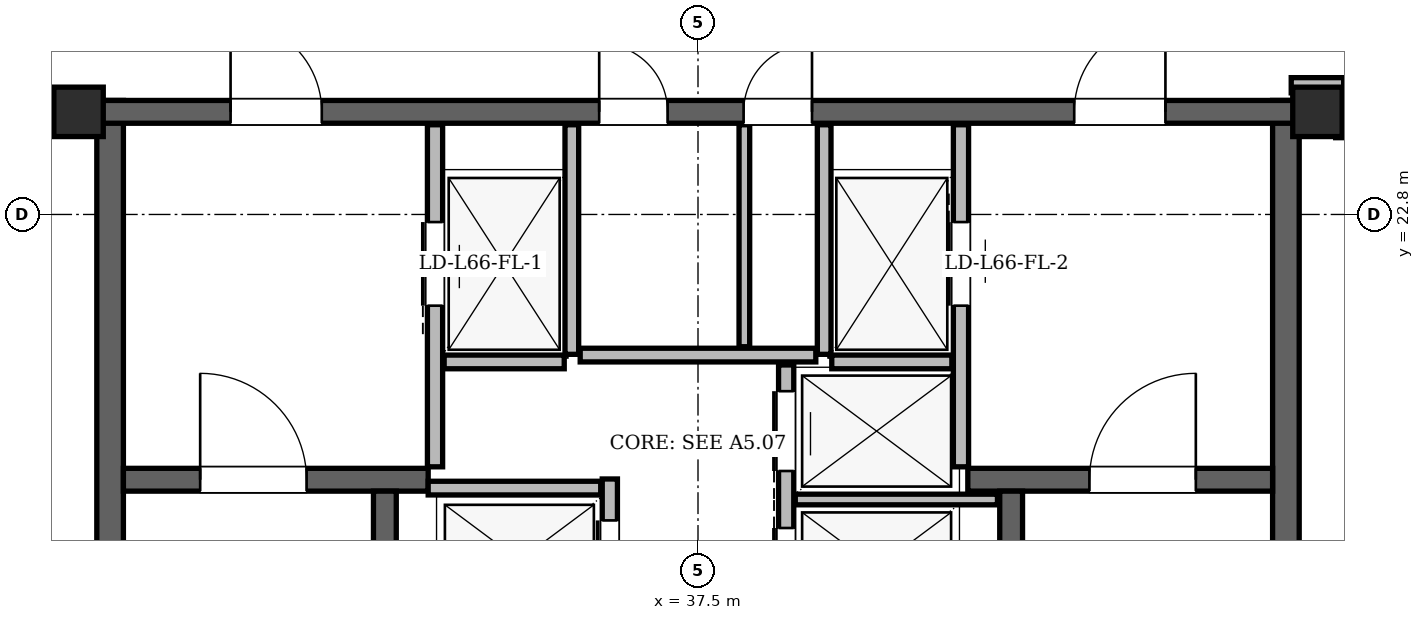
"""IFC4 building model, lengths in metres.
Left out: names, types, materials, properties, quantities, classifications, styles, units other than length and angle.
Written with IfcOpenShell. Run it as: python <this file> out.ifc"""

import sys

from ifc_helpers import new_model, si_unit, direction, frame, frame_2d, origin, origin_2d, place, context, subcontext, project, spatial, rectangle, hollow_rectangle, extrude, element, fill, save


model = new_model("IFC4")
c1 = context("Model", 3, precision=1e-05, world=origin(), true_north=direction((0.0, 1.0)))
c2 = subcontext(c1, "Body", "Model", "MODEL_VIEW")
j1 = project(units=[si_unit("LENGTHUNIT", "METRE"), si_unit("PLANEANGLEUNIT", "RADIAN")], contexts=[c1])
p1 = place(None, origin())
s1 = spatial("IfcSite", under=j1, at=p1, CompositionType="ELEMENT")
p2 = place(p1, origin())
s2 = spatial("IfcBuilding", under=s1, at=p2, CompositionType="ELEMENT")
p3 = place(p2, frame((0.0, 0.0, 249.9)))
s3 = spatial("IfcBuildingStorey", under=s2, at=p3, CompositionType="ELEMENT", Elevation=249.9)
for number, where, z_axis, x_axis in (
    (1, (45.65, 24.15, 0.0), (0.0, 0.0, 1.0), (1.0, 0.0, 0.0)),
    (2, (29.35, 24.15, 0.0), (0.0, 0.0, 1.0), (1.0, 0.0, 0.0)),
):
    element("IfcColumn", number, at=place(p3, frame(where, z_axis=z_axis, x_axis=x_axis)), inside=s3, PredefinedType="COLUMN", context=c2, shape_type="SweptSolid", body=[
        extrude(hollow_rectangle(XDim=0.65, YDim=0.65, WallThickness=0.05, at=origin_2d()), origin(), (0.0, 0.0, 1.0), 3.9),
    ])
for number, where, z_axis, x_axis in (
    (3, (29.765, 11.0, 0.0), (0.0, 0.0, 1.0), (0.0, 1.0, 0.0)),
    (4, (45.235, 11.0, 0.0), (0.0, 0.0, 1.0), (0.0, 1.0, 0.0)),
):
    element("IfcWall", number, at=place(p3, frame(where, z_axis=z_axis, x_axis=x_axis)), inside=s3, PredefinedType="SHEAR", context=c2, shape_type="SweptSolid", body=[
        extrude(rectangle(XDim=13.3, YDim=0.35, at=frame_2d((6.65, 0.0))), origin(), (0.0, 0.0, 1.0), 3.68),
    ])
p4 = place(p3, frame((29.65, 24.15, 0.0), z_axis=(0.0, 0.0, 1.0), x_axis=(1.0, 0.0, 0.0)))
e5 = element("IfcWall", 5, at=p4, inside=s3, PredefinedType="SHEAR", context=c2, shape_type="SweptSolid", body=[
    extrude(rectangle(XDim=15.7, YDim=0.3, at=frame_2d((7.85, 0.0))), origin(), (0.0, 0.0, 1.0), 3.68),
])
p5 = place(p4, frame((1.7, 0.0, 0.0)))
e6 = element("IfcOpeningElement", 6, at=p5, cuts=e5, PredefinedType="OPENING", context=c2, shape_type="SweptSolid", body=[
    extrude(rectangle(XDim=1.2, YDim=2.2, at=frame_2d((0.6, 1.1))), frame((0.0, 0.15, 0.0), z_axis=(0.0, -1.0, 0.0), x_axis=(1.0, 0.0, 0.0)), (0.0, 0.0, 1.0), 0.3),
])
p6 = place(p4, frame((12.8, 0.0, 0.0)))
e7 = element("IfcOpeningElement", 7, at=p6, cuts=e5, PredefinedType="OPENING", context=c2, shape_type="SweptSolid", body=[
    extrude(rectangle(XDim=1.2, YDim=2.2, at=frame_2d((0.6, 1.1))), frame((0.0, 0.15, 0.0), z_axis=(0.0, -1.0, 0.0), x_axis=(1.0, 0.0, 0.0)), (0.0, 0.0, 1.0), 0.3),
])
p7 = place(p4, frame((6.55, 0.0, 0.0)))
e8 = element("IfcOpeningElement", 8, at=p7, cuts=e5, PredefinedType="OPENING", context=c2, shape_type="SweptSolid", body=[
    extrude(rectangle(XDim=0.9, YDim=2.05, at=frame_2d((0.45, 1.025))), frame((0.0, 0.15, 0.0), z_axis=(0.0, -1.0, 0.0), x_axis=(1.0, 0.0, 0.0)), (0.0, 0.0, 1.0), 0.3),
])
p8 = place(p4, frame((8.45, 0.0, 0.0)))
e9 = element("IfcOpeningElement", 9, at=p8, cuts=e5, PredefinedType="OPENING", context=c2, shape_type="SweptSolid", body=[
    extrude(rectangle(XDim=0.9, YDim=2.05, at=frame_2d((0.45, 1.025))), frame((0.0, 0.15, 0.0), z_axis=(0.0, -1.0, 0.0), x_axis=(1.0, 0.0, 0.0)), (0.0, 0.0, 1.0), 0.3),
])
p9 = place(p3, frame((29.94, 19.31, 0.0), z_axis=(0.0, 0.0, 1.0), x_axis=(1.0, 0.0, 0.0)))
e10 = element("IfcWall", 10, at=p9, inside=s3, PredefinedType="SHEAR", context=c2, shape_type="SweptSolid", body=[
    extrude(rectangle(XDim=4.01, YDim=0.3, at=frame_2d((2.005, 0.0))), origin(), (0.0, 0.0, 1.0), 3.68),
])
p10 = place(p9, frame((1.01, 0.0, 0.0)))
e11 = element("IfcOpeningElement", 11, at=p10, cuts=e10, PredefinedType="OPENING", context=c2, shape_type="SweptSolid", body=[
    extrude(rectangle(XDim=1.4, YDim=2.2, at=frame_2d((0.7, 1.1))), frame((0.0, 0.15, 0.0), z_axis=(0.0, -1.0, 0.0), x_axis=(1.0, 0.0, 0.0)), (0.0, 0.0, 1.0), 0.3),
])
p11 = place(p3, frame((41.05, 19.31, 0.0), z_axis=(0.0, 0.0, 1.0), x_axis=(1.0, 0.0, 0.0)))
e12 = element("IfcWall", 12, at=p11, inside=s3, PredefinedType="SHEAR", context=c2, shape_type="SweptSolid", body=[
    extrude(rectangle(XDim=4.01, YDim=0.3, at=frame_2d((2.005, 0.0))), origin(), (0.0, 0.0, 1.0), 3.68),
])
p12 = place(p11, frame((1.6, 0.0, 0.0)))
e13 = element("IfcOpeningElement", 13, at=p12, cuts=e12, PredefinedType="OPENING", context=c2, shape_type="SweptSolid", body=[
    extrude(rectangle(XDim=1.4, YDim=2.2, at=frame_2d((0.7, 1.1))), frame((0.0, 0.15, 0.0), z_axis=(0.0, -1.0, 0.0), x_axis=(1.0, 0.0, 0.0)), (0.0, 0.0, 1.0), 0.3),
])
for number, where, z_axis, x_axis in (
    (14, (33.38, 11.54, 0.0), (0.0, 0.0, 1.0), (0.0, 1.0, 0.0)),
    (15, (41.62, 11.54, 0.0), (0.0, 0.0, 1.0), (0.0, 1.0, 0.0)),
):
    element("IfcWall", number, at=place(p3, frame(where, z_axis=z_axis, x_axis=x_axis)), inside=s3, PredefinedType="SHEAR", context=c2, shape_type="SweptSolid", body=[
        extrude(rectangle(XDim=7.62, YDim=0.3, at=frame_2d((3.81, 0.0))), origin(), (0.0, 0.0, 1.0), 3.68),
    ])
p13 = place(p3, frame((58.774, 10.99, 0.0), z_axis=(0.0, 0.0, 1.0), x_axis=(-0.499994896969, 0.866028350001, 0.0)))
e16 = element("IfcWall", 16, at=p13, inside=s3, PredefinedType="SOLIDWALL", context=c2, shape_type="SweptSolid", body=[
    extrude(rectangle(XDim=37.053, YDim=0.29, at=frame_2d((18.526, 0.0))), origin(), (0.0, 0.0, 1.0), 3.058),
])
p14 = place(p13, frame((6.789, 0.0, 0.0)))
e17 = element("IfcOpeningElement", 17, at=p14, cuts=e16, PredefinedType="OPENING", context=c2, shape_type="SweptSolid", body=[
    extrude(rectangle(XDim=1.5, YDim=2.2, at=frame_2d((0.75, 1.1))), frame((0.0, 0.145, 0.0), z_axis=(0.0, -1.0, 0.0), x_axis=(1.0, 0.0, 0.0)), (0.0, 0.0, 1.0), 0.29),
])
p15 = place(p13, frame((28.148, 0.0, 0.0)))
e18 = element("IfcOpeningElement", 18, at=p15, cuts=e16, PredefinedType="OPENING", context=c2, shape_type="SweptSolid", body=[
    extrude(rectangle(XDim=1.5, YDim=2.2, at=frame_2d((0.75, 1.1))), frame((0.0, 0.145, 0.0), z_axis=(0.0, -1.0, 0.0), x_axis=(1.0, 0.0, 0.0)), (0.0, 0.0, 1.0), 0.29),
])
p16 = place(p13, frame((12.184, 0.0, 0.85)))
e19 = element("IfcOpeningElement", 19, at=p16, cuts=e16, PredefinedType="OPENING", context=c2, shape_type="SweptSolid", body=[
    extrude(rectangle(XDim=2.6, YDim=1.95, at=frame_2d((1.3, 0.975))), frame((0.0, 0.145, 0.0), z_axis=(0.0, -1.0, 0.0), x_axis=(1.0, 0.0, 0.0)), (0.0, 0.0, 1.0), 0.29),
])
p17 = place(p13, frame((1.066, 0.0, 0.85)))
e20 = element("IfcOpeningElement", 20, at=p17, cuts=e16, PredefinedType="OPENING", context=c2, shape_type="SweptSolid", body=[
    extrude(rectangle(XDim=2.4, YDim=1.9, at=frame_2d((1.2, 0.95))), frame((0.0, 0.145, 0.0), z_axis=(0.0, -1.0, 0.0), x_axis=(1.0, 0.0, 0.0)), (0.0, 0.0, 1.0), 0.29),
])
p18 = place(p13, frame((33.328, 0.0, 0.85)))
e21 = element("IfcOpeningElement", 21, at=p18, cuts=e16, PredefinedType="OPENING", context=c2, shape_type="SweptSolid", body=[
    extrude(rectangle(XDim=1.2, YDim=1.48, at=frame_2d((0.6, 0.74))), frame((0.0, 0.145, 0.0), z_axis=(0.0, -1.0, 0.0), x_axis=(1.0, 0.0, 0.0)), (0.0, 0.0, 1.0), 0.29),
])
p19 = place(p13, frame((15.822, 0.0, 0.85)))
e22 = element("IfcOpeningElement", 22, at=p19, cuts=e16, PredefinedType="OPENING", context=c2, shape_type="SweptSolid", body=[
    extrude(rectangle(XDim=1.2, YDim=1.48, at=frame_2d((0.6, 0.74))), frame((0.0, 0.145, 0.0), z_axis=(0.0, -1.0, 0.0), x_axis=(1.0, 0.0, 0.0)), (0.0, 0.0, 1.0), 0.29),
])
p20 = place(p13, frame((23.327, 0.0, 0.85)))
e23 = element("IfcOpeningElement", 23, at=p20, cuts=e16, PredefinedType="OPENING", context=c2, shape_type="SweptSolid", body=[
    extrude(rectangle(XDim=1.2, YDim=1.48, at=frame_2d((0.6, 0.74))), frame((0.0, 0.145, 0.0), z_axis=(0.0, -1.0, 0.0), x_axis=(1.0, 0.0, 0.0)), (0.0, 0.0, 1.0), 0.29),
])
p21 = place(p3, frame((34.752, 43.079, 0.0), z_axis=(0.0, 0.0, 1.0), x_axis=(-0.499994896969, -0.866028350001, 0.0)))
e24 = element("IfcWall", 24, at=p21, inside=s3, PredefinedType="SOLIDWALL", context=c2, shape_type="SweptSolid", body=[
    extrude(rectangle(XDim=37.053, YDim=0.29, at=frame_2d((18.526, 0.0))), origin(), (0.0, 0.0, 1.0), 3.058),
])
p22 = place(p21, frame((3.639, 0.0, 0.0)))
e25 = element("IfcOpeningElement", 25, at=p22, cuts=e24, PredefinedType="OPENING", context=c2, shape_type="SweptSolid", body=[
    extrude(rectangle(XDim=1.5, YDim=2.2, at=frame_2d((0.75, 1.1))), frame((0.0, 0.145, 0.0), z_axis=(0.0, -1.0, 0.0), x_axis=(1.0, 0.0, 0.0)), (0.0, 0.0, 1.0), 0.29),
])
p23 = place(p21, frame((27.518, 0.0, 0.0)))
e26 = element("IfcOpeningElement", 26, at=p23, cuts=e24, PredefinedType="OPENING", context=c2, shape_type="SweptSolid", body=[
    extrude(rectangle(XDim=1.5, YDim=2.2, at=frame_2d((0.75, 1.1))), frame((0.0, 0.145, 0.0), z_axis=(0.0, -1.0, 0.0), x_axis=(1.0, 0.0, 0.0)), (0.0, 0.0, 1.0), 0.29),
])
p24 = place(p21, frame((22.803, 0.0, 0.85)))
e27 = element("IfcOpeningElement", 27, at=p24, cuts=e24, PredefinedType="OPENING", context=c2, shape_type="SweptSolid", body=[
    extrude(rectangle(XDim=1.6, YDim=1.7, at=frame_2d((0.8, 0.85))), frame((0.0, 0.145, 0.0), z_axis=(0.0, -1.0, 0.0), x_axis=(1.0, 0.0, 0.0)), (0.0, 0.0, 1.0), 0.29),
])
p25 = place(p21, frame((34.371, 0.0, 0.85)))
e28 = element("IfcOpeningElement", 28, at=p25, cuts=e24, PredefinedType="OPENING", context=c2, shape_type="SweptSolid", body=[
    extrude(rectangle(XDim=1.4, YDim=1.6, at=frame_2d((0.7, 0.8))), frame((0.0, 0.145, 0.0), z_axis=(0.0, -1.0, 0.0), x_axis=(1.0, 0.0, 0.0)), (0.0, 0.0, 1.0), 0.29),
])
p26 = place(p21, frame((8.135, 0.0, 0.85)))
e29 = element("IfcOpeningElement", 29, at=p26, cuts=e24, PredefinedType="OPENING", context=c2, shape_type="SweptSolid", body=[
    extrude(rectangle(XDim=1.8, YDim=1.75, at=frame_2d((0.9, 0.875))), frame((0.0, 0.145, 0.0), z_axis=(0.0, -1.0, 0.0), x_axis=(1.0, 0.0, 0.0)), (0.0, 0.0, 1.0), 0.29),
])
p27 = place(p21, frame((17.81, 0.0, 0.85)))
e30 = element("IfcOpeningElement", 30, at=p27, cuts=e24, PredefinedType="OPENING", context=c2, shape_type="SweptSolid", body=[
    extrude(rectangle(XDim=1.2, YDim=1.48, at=frame_2d((0.6, 0.74))), frame((0.0, 0.145, 0.0), z_axis=(0.0, -1.0, 0.0), x_axis=(1.0, 0.0, 0.0)), (0.0, 0.0, 1.0), 0.29),
])
p28 = place(p21, frame((1.294, 0.0, 0.85)))
e31 = element("IfcOpeningElement", 31, at=p28, cuts=e24, PredefinedType="OPENING", context=c2, shape_type="SweptSolid", body=[
    extrude(rectangle(XDim=1.6, YDim=1.7, at=frame_2d((0.8, 0.85))), frame((0.0, 0.145, 0.0), z_axis=(0.0, -1.0, 0.0), x_axis=(1.0, 0.0, 0.0)), (0.0, 0.0, 1.0), 0.29),
])
p29 = place(p3, frame((34.04, 19.48, 0.0), z_axis=(0.0, 0.0, 1.0), x_axis=(0.0, 1.0, 0.0)))
e32 = element("IfcWall", 32, at=p29, inside=s3, PredefinedType="PARTITIONING", context=c2, shape_type="SweptSolid", body=[
    extrude(rectangle(XDim=4.5, YDim=0.2, at=frame_2d((2.25, 0.0))), origin(), (0.0, 0.0, 1.0), 3.68),
])
p30 = place(p29, frame((2.12, 0.0, 0.0)))
e33 = element("IfcOpeningElement", 33, at=p30, cuts=e32, PredefinedType="OPENING", context=c2, shape_type="SweptSolid", body=[
    extrude(rectangle(XDim=1.1, YDim=2.2, at=frame_2d((0.55, 1.1))), frame((0.0, 0.1, 0.0), z_axis=(0.0, -1.0, 0.0), x_axis=(1.0, 0.0, 0.0)), (0.0, 0.0, 1.0), 0.2),
])
p31 = place(p3, frame((35.84, 20.96, 0.0), z_axis=(0.0, 0.0, 1.0), x_axis=(0.0, 1.0, 0.0)))
e34 = element("IfcWall", 34, at=p31, inside=s3, PredefinedType="PARTITIONING", context=c2, shape_type="SweptSolid", body=[
    extrude(rectangle(XDim=3.02, YDim=0.18, at=frame_2d((1.51, 0.0))), origin(), (0.0, 0.0, 1.0), 3.68),
])
p32 = place(p3, frame((34.16, 20.86, 0.0), z_axis=(0.0, 0.0, 1.0), x_axis=(1.0, 0.0, 0.0)))
e35 = element("IfcWall", 35, at=p32, inside=s3, PredefinedType="PARTITIONING", context=c2, shape_type="SweptSolid", body=[
    extrude(rectangle(XDim=1.58, YDim=0.18, at=frame_2d((0.79, 0.0))), origin(), (0.0, 0.0, 1.0), 3.68),
])
p33 = place(p3, frame((40.96, 19.48, 0.0), z_axis=(0.0, 0.0, 1.0), x_axis=(0.0, 1.0, 0.0)))
e36 = element("IfcWall", 36, at=p33, inside=s3, PredefinedType="PARTITIONING", context=c2, shape_type="SweptSolid", body=[
    extrude(rectangle(XDim=4.5, YDim=0.2, at=frame_2d((2.25, 0.0))), origin(), (0.0, 0.0, 1.0), 3.68),
])
p34 = place(p33, frame((2.12, 0.0, 0.0)))
e37 = element("IfcOpeningElement", 37, at=p34, cuts=e36, PredefinedType="OPENING", context=c2, shape_type="SweptSolid", body=[
    extrude(rectangle(XDim=1.1, YDim=2.2, at=frame_2d((0.55, 1.1))), frame((0.0, 0.1, 0.0), z_axis=(0.0, -1.0, 0.0), x_axis=(1.0, 0.0, 0.0)), (0.0, 0.0, 1.0), 0.2),
])
p35 = place(p3, frame((39.16, 20.96, 0.0), z_axis=(0.0, 0.0, 1.0), x_axis=(0.0, 1.0, 0.0)))
e38 = element("IfcWall", 38, at=p35, inside=s3, PredefinedType="PARTITIONING", context=c2, shape_type="SweptSolid", body=[
    extrude(rectangle(XDim=3.02, YDim=0.18, at=frame_2d((1.51, 0.0))), origin(), (0.0, 0.0, 1.0), 3.68),
])
p36 = place(p3, frame((39.26, 20.86, 0.0), z_axis=(0.0, 0.0, 1.0), x_axis=(1.0, 0.0, 0.0)))
e39 = element("IfcWall", 39, at=p36, inside=s3, PredefinedType="PARTITIONING", context=c2, shape_type="SweptSolid", body=[
    extrude(rectangle(XDim=1.58, YDim=0.18, at=frame_2d((0.79, 0.0))), origin(), (0.0, 0.0, 1.0), 3.68),
])
p37 = place(p3, frame((36.34, 17.25, 0.0), z_axis=(0.0, 0.0, 1.0), x_axis=(0.0, 1.0, 0.0)))
e40 = element("IfcWall", 40, at=p37, inside=s3, PredefinedType="PARTITIONING", context=c2, shape_type="SweptSolid", body=[
    extrude(rectangle(XDim=2.07, YDim=0.2, at=frame_2d((1.035, 0.0))), origin(), (0.0, 0.0, 1.0), 3.68),
])
p38 = place(p37, frame((0.475, 0.0, 0.0)))
e41 = element("IfcOpeningElement", 41, at=p38, cuts=e40, PredefinedType="OPENING", context=c2, shape_type="SweptSolid", body=[
    extrude(rectangle(XDim=1.05, YDim=2.15, at=frame_2d((0.525, 1.075))), frame((0.0, 0.1, 0.0), z_axis=(0.0, -1.0, 0.0), x_axis=(1.0, 0.0, 0.0)), (0.0, 0.0, 1.0), 0.2),
])
p39 = place(p3, frame((33.95, 19.2, 0.0), z_axis=(0.0, 0.0, 1.0), x_axis=(1.0, 0.0, 0.0)))
e42 = element("IfcWall", 42, at=p39, inside=s3, PredefinedType="PARTITIONING", context=c2, shape_type="SweptSolid", body=[
    extrude(rectangle(XDim=2.27, YDim=0.18, at=frame_2d((1.135, 0.0))), origin(), (0.0, 0.0, 1.0), 3.68),
])
p40 = place(p3, frame((38.66, 17.2, 0.0), z_axis=(0.0, 0.0, 1.0), x_axis=(0.0, 1.0, 0.0)))
e43 = element("IfcWall", 43, at=p40, inside=s3, PredefinedType="PARTITIONING", context=c2, shape_type="SweptSolid", body=[
    extrude(rectangle(XDim=3.62, YDim=0.2, at=frame_2d((1.81, 0.0))), origin(), (0.0, 0.0, 1.0), 3.68),
])
p41 = place(p40, frame((0.425, 0.0, 0.0)))
e44 = element("IfcOpeningElement", 44, at=p41, cuts=e43, PredefinedType="OPENING", context=c2, shape_type="SweptSolid", body=[
    extrude(rectangle(XDim=1.05, YDim=2.15, at=frame_2d((0.525, 1.075))), frame((0.0, 0.1, 0.0), z_axis=(0.0, -1.0, 0.0), x_axis=(1.0, 0.0, 0.0)), (0.0, 0.0, 1.0), 0.2),
])
p42 = place(p40, frame((2.225, 0.0, 0.0)))
e45 = element("IfcOpeningElement", 45, at=p42, cuts=e43, PredefinedType="OPENING", context=c2, shape_type="SweptSolid", body=[
    extrude(rectangle(XDim=1.05, YDim=2.15, at=frame_2d((0.525, 1.075))), frame((0.0, 0.1, 0.0), z_axis=(0.0, -1.0, 0.0), x_axis=(1.0, 0.0, 0.0)), (0.0, 0.0, 1.0), 0.2),
])
p43 = place(p3, frame((38.78, 19.05, 0.0), z_axis=(0.0, 0.0, 1.0), x_axis=(1.0, 0.0, 0.0)))
e46 = element("IfcWall", 46, at=p43, inside=s3, PredefinedType="PARTITIONING", context=c2, shape_type="SweptSolid", body=[
    extrude(rectangle(XDim=2.66, YDim=0.14, at=frame_2d((1.33, 0.0))), origin(), (0.0, 0.0, 1.0), 3.68),
])
p44 = place(p3, frame((35.95, 20.95, 0.0), z_axis=(0.0, 0.0, 1.0), x_axis=(1.0, 0.0, 0.0)))
e47 = element("IfcWall", 47, at=p44, inside=s3, PredefinedType="PARTITIONING", context=c2, shape_type="SweptSolid", body=[
    extrude(rectangle(XDim=3.1, YDim=0.18, at=frame_2d((1.55, 0.0))), origin(), (0.0, 0.0, 1.0), 3.68),
])
p45 = place(p3, frame((38.11, 21.06, 0.0), z_axis=(0.0, 0.0, 1.0), x_axis=(0.0, 1.0, 0.0)))
e48 = element("IfcWall", 48, at=p45, inside=s3, PredefinedType="PARTITIONING", context=c2, shape_type="SweptSolid", body=[
    extrude(rectangle(XDim=2.92, YDim=0.14, at=frame_2d((1.46, 0.0))), origin(), (0.0, 0.0, 1.0), 3.68),
])
p46 = place(p3, frame((24.094, 24.32, 0.0), z_axis=(0.0, 0.0, 1.0), x_axis=(1.0, 0.0, 0.0)))
e49 = element("IfcWall", 49, at=p46, inside=s3, PredefinedType="PARTITIONING", context=c2, shape_type="SweptSolid", body=[
    extrude(rectangle(XDim=4.917, YDim=0.2, at=frame_2d((2.458, 0.0))), origin(), (0.0, 0.0, 1.0), 3.68),
])
p47 = place(p46, frame((1.788, 0.0, 0.0)))
e50 = element("IfcOpeningElement", 50, at=p47, cuts=e49, PredefinedType="OPENING", context=c2, shape_type="SweptSolid", body=[
    extrude(rectangle(XDim=1.0, YDim=2.18, at=frame_2d((0.5, 1.09))), frame((0.0, 0.1, 0.0), z_axis=(0.0, -1.0, 0.0), x_axis=(1.0, 0.0, 0.0)), (0.0, 0.0, 1.0), 0.2),
])
p48 = place(p3, frame((45.305, 24.5, 0.0), z_axis=(0.0, 0.0, 1.0), x_axis=(1.0, 0.0, 0.0)))
e51 = element("IfcWall", 51, at=p48, inside=s3, PredefinedType="PARTITIONING", context=c2, shape_type="SweptSolid", body=[
    extrude(rectangle(XDim=0.69, YDim=0.2, at=frame_2d((0.345, 0.0))), origin(), (0.0, 0.0, 1.0), 3.266),
])
p49 = place(p3, frame((45.99, 23.81, 0.0), z_axis=(0.0, 0.0, 1.0), x_axis=(0.0, 1.0, 0.0)))
e52 = element("IfcWall", 52, at=p49, inside=s3, PredefinedType="PARTITIONING", context=c2, shape_type="SweptSolid", body=[
    extrude(rectangle(XDim=0.51, YDim=0.2, at=frame_2d((0.255, 0.0))), origin(), (0.0, 0.0, 1.0), 3.68),
])
p50 = place(p30, origin())
e53 = element("IfcDoor", 53, at=p50, inside=s3, OperationType="SLIDING_TO_LEFT", PredefinedType="DOOR", context=c2, shape_type="SweptSolid", body=[
    extrude(rectangle(XDim=1.1, YDim=2.2, at=frame_2d((0.55, 1.1))), frame((0.0, 0.025, 0.0), z_axis=(0.0, -1.0, 0.0), x_axis=(1.0, 0.0, 0.0)), (0.0, 0.0, 1.0), 0.05),
])
fill(e33, e53)
p51 = place(p34, origin())
e54 = element("IfcDoor", 54, at=p51, inside=s3, OperationType="SLIDING_TO_RIGHT", PredefinedType="DOOR", context=c2, shape_type="SweptSolid", body=[
    extrude(rectangle(XDim=1.1, YDim=2.2, at=frame_2d((0.55, 1.1))), frame((0.0, 0.025, 0.0), z_axis=(0.0, -1.0, 0.0), x_axis=(1.0, 0.0, 0.0)), (0.0, 0.0, 1.0), 0.05),
])
fill(e37, e54)
p52 = place(p38, origin())
e55 = element("IfcDoor", 55, at=p52, inside=s3, OperationType="SLIDING_TO_LEFT", PredefinedType="DOOR", context=c2, shape_type="SweptSolid", body=[
    extrude(rectangle(XDim=1.05, YDim=2.15, at=frame_2d((0.525, 1.075))), frame((0.0, 0.025, 0.0), z_axis=(0.0, -1.0, 0.0), x_axis=(1.0, 0.0, 0.0)), (0.0, 0.0, 1.0), 0.05),
])
fill(e41, e55)
p53 = place(p41, origin())
e56 = element("IfcDoor", 56, at=p53, inside=s3, OperationType="SLIDING_TO_RIGHT", PredefinedType="DOOR", context=c2, shape_type="SweptSolid", body=[
    extrude(rectangle(XDim=1.05, YDim=2.15, at=frame_2d((0.525, 1.075))), frame((0.0, 0.025, 0.0), z_axis=(0.0, -1.0, 0.0), x_axis=(1.0, 0.0, 0.0)), (0.0, 0.0, 1.0), 0.05),
])
fill(e44, e56)
p54 = place(p42, origin())
e57 = element("IfcDoor", 57, at=p54, inside=s3, OperationType="SLIDING_TO_LEFT", PredefinedType="DOOR", context=c2, shape_type="SweptSolid", body=[
    extrude(rectangle(XDim=1.05, YDim=2.15, at=frame_2d((0.525, 1.075))), frame((0.0, 0.025, 0.0), z_axis=(0.0, -1.0, 0.0), x_axis=(1.0, 0.0, 0.0)), (0.0, 0.0, 1.0), 0.05),
])
fill(e45, e57)
p55 = place(p10, origin())
e58 = element("IfcDoor", 58, at=p55, inside=s3, OperationType="SINGLE_SWING_LEFT", PredefinedType="DOOR", context=c2, shape_type="SweptSolid", body=[
    extrude(rectangle(XDim=1.4, YDim=2.2, at=frame_2d((0.7, 1.1))), frame((0.0, 0.025, 0.0), z_axis=(0.0, -1.0, 0.0), x_axis=(1.0, 0.0, 0.0)), (0.0, 0.0, 1.0), 0.05),
])
fill(e11, e58)
p56 = place(p12, origin())
e59 = element("IfcDoor", 59, at=p56, inside=s3, OperationType="SINGLE_SWING_RIGHT", PredefinedType="DOOR", context=c2, shape_type="SweptSolid", body=[
    extrude(rectangle(XDim=1.4, YDim=2.2, at=frame_2d((0.7, 1.1))), frame((0.0, 0.025, 0.0), z_axis=(0.0, -1.0, 0.0), x_axis=(1.0, 0.0, 0.0)), (0.0, 0.0, 1.0), 0.05),
])
fill(e13, e59)
p57 = place(p5, origin())
e60 = element("IfcDoor", 60, at=p57, inside=s3, OperationType="SINGLE_SWING_LEFT", PredefinedType="DOOR", context=c2, shape_type="SweptSolid", body=[
    extrude(rectangle(XDim=1.2, YDim=2.2, at=frame_2d((0.6, 1.1))), frame((0.0, 0.025, 0.0), z_axis=(0.0, -1.0, 0.0), x_axis=(1.0, 0.0, 0.0)), (0.0, 0.0, 1.0), 0.05),
])
fill(e6, e60)
p58 = place(p6, origin())
e61 = element("IfcDoor", 61, at=p58, inside=s3, OperationType="SINGLE_SWING_RIGHT", PredefinedType="DOOR", context=c2, shape_type="SweptSolid", body=[
    extrude(rectangle(XDim=1.2, YDim=2.2, at=frame_2d((0.6, 1.1))), frame((0.0, 0.025, 0.0), z_axis=(0.0, -1.0, 0.0), x_axis=(1.0, 0.0, 0.0)), (0.0, 0.0, 1.0), 0.05),
])
fill(e7, e61)
p59 = place(p7, origin())
e62 = element("IfcDoor", 62, at=p59, inside=s3, OperationType="SINGLE_SWING_LEFT", PredefinedType="DOOR", context=c2, shape_type="SweptSolid", body=[
    extrude(rectangle(XDim=0.9, YDim=2.05, at=frame_2d((0.45, 1.025))), frame((0.0, 0.025, 0.0), z_axis=(0.0, -1.0, 0.0), x_axis=(1.0, 0.0, 0.0)), (0.0, 0.0, 1.0), 0.05),
])
fill(e8, e62)
p60 = place(p8, origin())
e63 = element("IfcDoor", 63, at=p60, inside=s3, OperationType="SINGLE_SWING_RIGHT", PredefinedType="DOOR", context=c2, shape_type="SweptSolid", body=[
    extrude(rectangle(XDim=0.9, YDim=2.05, at=frame_2d((0.45, 1.025))), frame((0.0, 0.025, 0.0), z_axis=(0.0, -1.0, 0.0), x_axis=(1.0, 0.0, 0.0)), (0.0, 0.0, 1.0), 0.05),
])
fill(e9, e63)
save(model, sys.argv[1])
